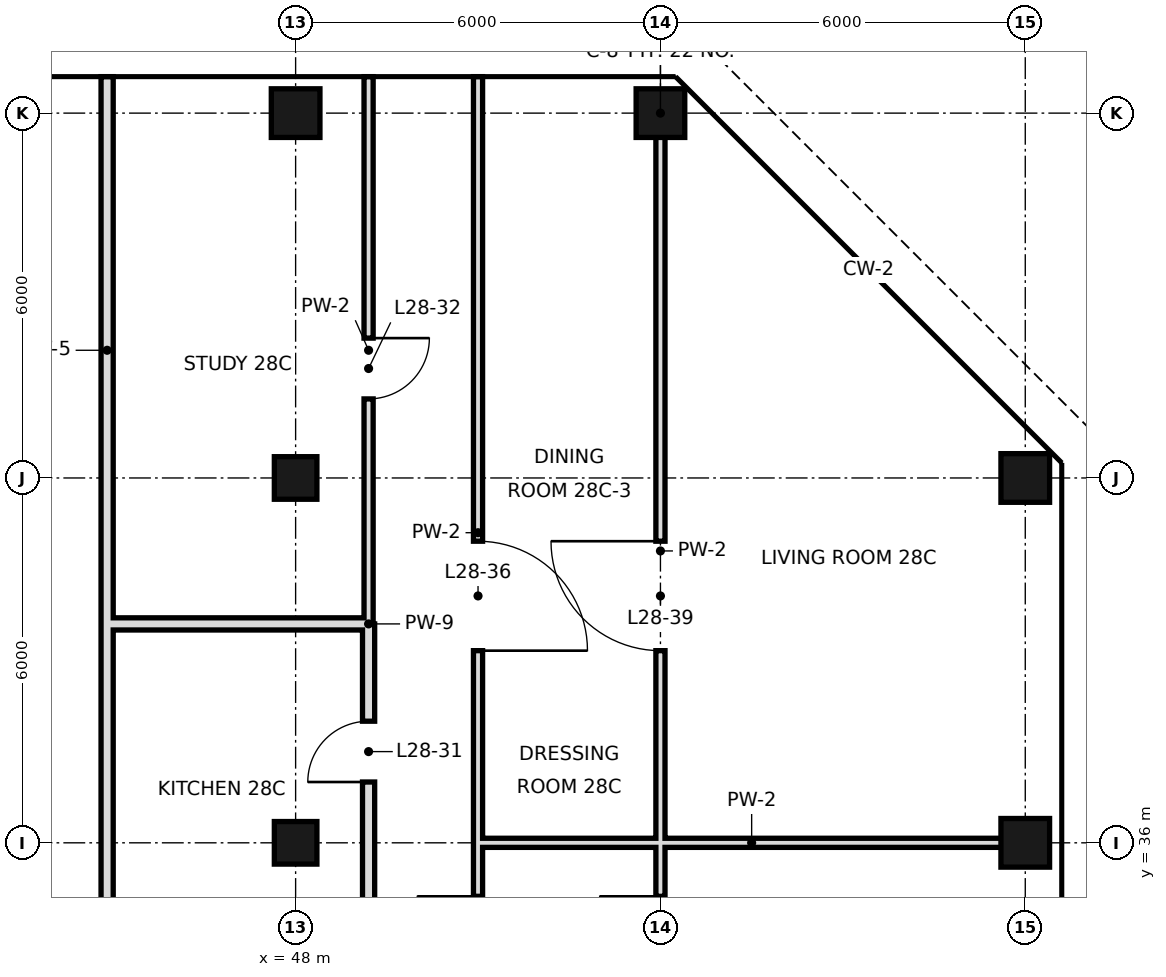
"""IFC4 building model, lengths in metres.
Left out: names, types, materials, properties, quantities, classifications, styles, units other than length and angle.
Written with IfcOpenShell. Run it as: python <this file> out.ifc"""

import sys

from ifc_helpers import new_model, si_unit, direction, frame, frame_2d, origin, origin_2d, place, context, subcontext, project, spatial, rectangle, hollow_rectangle, extrude, element, fill, save


model = new_model("IFC4")
c1 = context("Model", 3, precision=1e-05, world=origin(), true_north=direction((0.0, 1.0)))
c2 = subcontext(c1, "Body", "Model", "MODEL_VIEW")
j1 = project(units=[si_unit("LENGTHUNIT", "METRE"), si_unit("PLANEANGLEUNIT", "RADIAN")], contexts=[c1])
p1 = place(None, origin())
s1 = spatial("IfcSite", under=j1, at=p1, CompositionType="ELEMENT")
p2 = place(p1, origin())
s2 = spatial("IfcBuilding", under=s1, at=p2, CompositionType="ELEMENT")
p3 = place(p2, frame((0.0, 0.0, 126.8)))
s3 = spatial("IfcBuildingStorey", under=s2, at=p3, CompositionType="ELEMENT", Elevation=126.8)
for number, where, z_axis, x_axis in (
    (1, (48.0, 36.0, 0.0), (0.0, 0.0, 1.0), (1.0, 0.0, 0.0)),
    (2, (48.0, 42.0, 0.0), (0.0, 0.0, 1.0), (1.0, 0.0, 0.0)),
):
    element("IfcColumn", number, at=place(p3, frame(where, z_axis=z_axis, x_axis=x_axis)), inside=s3, PredefinedType="COLUMN", context=c2, shape_type="SweptSolid", body=[
        extrude(hollow_rectangle(XDim=0.7, YDim=0.7, WallThickness=0.036, at=origin_2d()), origin(), (0.0, 0.0, 1.0), 3.6),
    ])
for number, where, z_axis, x_axis in (
    (3, (48.0, 48.0, 0.0), (0.0, 0.0, 1.0), (1.0, 0.0, 0.0)),
    (4, (54.0, 48.0, 0.0), (0.0, 0.0, 1.0), (1.0, 0.0, 0.0)),
    (5, (60.0, 36.0, 0.0), (0.0, 0.0, 1.0), (1.0, 0.0, 0.0)),
    (6, (60.0, 42.0, 0.0), (0.0, 0.0, 1.0), (1.0, 0.0, 0.0)),
):
    element("IfcColumn", number, at=place(p3, frame(where, z_axis=z_axis, x_axis=x_axis)), inside=s3, PredefinedType="COLUMN", context=c2, shape_type="SweptSolid", body=[
        extrude(hollow_rectangle(XDim=0.8, YDim=0.8, WallThickness=0.04, at=origin_2d()), origin(), (0.0, 0.0, 1.0), 3.6),
    ])
p4 = place(p3, frame((44.9, 39.6, 0.0), z_axis=(0.0, 0.0, 1.0), x_axis=(0.0, 1.0, 0.0)))
e7 = element("IfcWall", 7, at=p4, inside=s3, PredefinedType="SOLIDWALL", context=c2, shape_type="SweptSolid", body=[
    extrude(rectangle(XDim=9.0, YDim=0.2, at=frame_2d((4.5, 0.0))), origin(), (0.0, 0.0, 1.0), 2.72),
])
p5 = place(p3, frame((44.9, 33.6, 0.0), z_axis=(0.0, 0.0, 1.0), x_axis=(0.0, 1.0, 0.0)))
e8 = element("IfcWall", 8, at=p5, inside=s3, PredefinedType="SOLIDWALL", context=c2, shape_type="SweptSolid", body=[
    extrude(rectangle(XDim=6.0, YDim=0.2, at=frame_2d((3.0, 0.0))), origin(), (0.0, 0.0, 1.0), 3.42),
])
p6 = place(p3, frame((49.2, 33.6, 0.0), z_axis=(0.0, 0.0, 1.0), x_axis=(0.0, 1.0, 0.0)))
e9 = element("IfcWall", 9, at=p6, inside=s3, PredefinedType="SOLIDWALL", context=c2, shape_type="SweptSolid", body=[
    extrude(rectangle(XDim=6.0, YDim=0.2, at=frame_2d((3.0, 0.0))), origin(), (0.0, 0.0, 1.0), 2.72),
])
p7 = place(p6, frame((3.4, 0.0, 0.0)))
e10 = element("IfcOpeningElement", 10, at=p7, cuts=e9, PredefinedType="OPENING", context=c2, shape_type="SweptSolid", body=[
    extrude(rectangle(XDim=1.0, YDim=2.4, at=frame_2d((0.5, 1.2))), frame((0.0, 0.11, 0.0), z_axis=(0.0, -1.0, 0.0), x_axis=(1.0, 0.0, 0.0)), (0.0, 0.0, 1.0), 0.22),
])
p8 = place(p3, frame((49.2, 39.6, 0.0), z_axis=(0.0, 0.0, 1.0), x_axis=(0.0, 1.0, 0.0)))
e11 = element("IfcWall", 11, at=p8, inside=s3, PredefinedType="PARTITIONING", context=c2, shape_type="SweptSolid", body=[
    extrude(rectangle(XDim=9.0, YDim=0.15, at=frame_2d((4.5, 0.0))), origin(), (0.0, 0.0, 1.0), 3.42),
])
p9 = place(p8, frame((3.7, 0.0, 0.0)))
e12 = element("IfcOpeningElement", 12, at=p9, cuts=e11, PredefinedType="OPENING", context=c2, shape_type="SweptSolid", body=[
    extrude(rectangle(XDim=1.0, YDim=2.4, at=frame_2d((0.5, 1.2))), frame((0.0, 0.085, 0.0), z_axis=(0.0, -1.0, 0.0), x_axis=(1.0, 0.0, 0.0)), (0.0, 0.0, 1.0), 0.17),
])
p10 = place(p3, frame((51.0, 33.6, 0.0), z_axis=(0.0, 0.0, 1.0), x_axis=(0.0, 1.0, 0.0)))
e13 = element("IfcWall", 13, at=p10, inside=s3, PredefinedType="PARTITIONING", context=c2, shape_type="SweptSolid", body=[
    extrude(rectangle(XDim=15.0, YDim=0.15, at=frame_2d((7.5, 0.0))), origin(), (0.0, 0.0, 1.0), 3.42),
])
p11 = place(p10, frame((0.52, 0.0, 0.0)))
e14 = element("IfcOpeningElement", 14, at=p11, cuts=e13, PredefinedType="OPENING", context=c2, shape_type="SweptSolid", body=[
    extrude(rectangle(XDim=1.0, YDim=2.4, at=frame_2d((0.5, 1.2))), frame((0.0, 0.085, 0.0), z_axis=(0.0, -1.0, 0.0), x_axis=(1.0, 0.0, 0.0)), (0.0, 0.0, 1.0), 0.17),
])
p12 = place(p10, frame((5.56, 0.0, 0.0)))
e15 = element("IfcOpeningElement", 15, at=p12, cuts=e13, PredefinedType="OPENING", context=c2, shape_type="SweptSolid", body=[
    extrude(rectangle(XDim=1.8, YDim=2.4, at=frame_2d((0.9, 1.2))), frame((0.0, 0.085, 0.0), z_axis=(0.0, -1.0, 0.0), x_axis=(1.0, 0.0, 0.0)), (0.0, 0.0, 1.0), 0.17),
])
p13 = place(p3, frame((54.0, 33.6, 0.0), z_axis=(0.0, 0.0, 1.0), x_axis=(0.0, 1.0, 0.0)))
e16 = element("IfcWall", 16, at=p13, inside=s3, PredefinedType="PARTITIONING", context=c2, shape_type="SweptSolid", body=[
    extrude(rectangle(XDim=14.4, YDim=0.15, at=frame_2d((7.2, 0.0))), origin(), (0.0, 0.0, 1.0), 3.42),
])
p14 = place(p13, frame((0.52, 0.0, 0.0)))
e17 = element("IfcOpeningElement", 17, at=p14, cuts=e16, PredefinedType="OPENING", context=c2, shape_type="SweptSolid", body=[
    extrude(rectangle(XDim=1.0, YDim=2.4, at=frame_2d((0.5, 1.2))), frame((0.0, 0.085, 0.0), z_axis=(0.0, -1.0, 0.0), x_axis=(1.0, 0.0, 0.0)), (0.0, 0.0, 1.0), 0.17),
])
p15 = place(p13, frame((5.56, 0.0, 0.0)))
e18 = element("IfcOpeningElement", 18, at=p15, cuts=e16, PredefinedType="OPENING", context=c2, shape_type="SweptSolid", body=[
    extrude(rectangle(XDim=1.8, YDim=2.4, at=frame_2d((0.9, 1.2))), frame((0.0, 0.085, 0.0), z_axis=(0.0, -1.0, 0.0), x_axis=(1.0, 0.0, 0.0)), (0.0, 0.0, 1.0), 0.17),
])
p16 = place(p3, frame((51.0, 36.0, 0.0), z_axis=(0.0, 0.0, 1.0), x_axis=(1.0, 0.0, 0.0)))
e19 = element("IfcWall", 19, at=p16, inside=s3, PredefinedType="PARTITIONING", context=c2, shape_type="SweptSolid", body=[
    extrude(rectangle(XDim=9.0, YDim=0.15, at=frame_2d((4.5, 0.0))), origin(), (0.0, 0.0, 1.0), 2.72),
])
p17 = place(p3, frame((44.9, 39.6, 0.0), z_axis=(0.0, 0.0, 1.0), x_axis=(1.0, 0.0, 0.0)))
e20 = element("IfcWall", 20, at=p17, inside=s3, PredefinedType="SOLIDWALL", context=c2, shape_type="SweptSolid", body=[
    extrude(rectangle(XDim=4.3, YDim=0.2, at=frame_2d((2.15, 0.0))), origin(), (0.0, 0.0, 1.0), 2.97),
])
p18 = place(p7, origin())
e21 = element("IfcDoor", 21, at=p18, inside=s3, OperationType="SINGLE_SWING_LEFT", PredefinedType="DOOR", context=c2, shape_type="SweptSolid", body=[
    extrude(rectangle(XDim=1.0, YDim=2.4, at=frame_2d((0.5, 1.2))), frame((0.0, 0.025, 0.0), z_axis=(0.0, -1.0, 0.0), x_axis=(1.0, 0.0, 0.0)), (0.0, 0.0, 1.0), 0.05),
])
fill(e10, e21)
p19 = place(p9, origin())
e22 = element("IfcDoor", 22, at=p19, inside=s3, OperationType="SINGLE_SWING_RIGHT", PredefinedType="DOOR", context=c2, shape_type="SweptSolid", body=[
    extrude(rectangle(XDim=1.0, YDim=2.4, at=frame_2d((0.5, 1.2))), frame((0.0, 0.025, 0.0), z_axis=(0.0, -1.0, 0.0), x_axis=(1.0, 0.0, 0.0)), (0.0, 0.0, 1.0), 0.05),
])
fill(e12, e22)
p20 = place(p11, frame((1.0, 0.0, 0.0), z_axis=(0.0, 0.0, 1.0), x_axis=(-1.0, 0.0, 0.0)))
e23 = element("IfcDoor", 23, at=p20, inside=s3, OperationType="SINGLE_SWING_LEFT", PredefinedType="DOOR", context=c2, shape_type="SweptSolid", body=[
    extrude(rectangle(XDim=1.0, YDim=2.4, at=frame_2d((0.5, 1.2))), frame((0.0, 0.025, 0.0), z_axis=(0.0, -1.0, 0.0), x_axis=(1.0, 0.0, 0.0)), (0.0, 0.0, 1.0), 0.05),
])
fill(e14, e23)
p21 = place(p12, frame((1.8, 0.0, 0.0), z_axis=(0.0, 0.0, 1.0), x_axis=(-1.0, 0.0, 0.0)))
e24 = element("IfcDoor", 24, at=p21, inside=s3, OperationType="SINGLE_SWING_RIGHT", PredefinedType="DOOR", context=c2, shape_type="SweptSolid", body=[
    extrude(rectangle(XDim=1.8, YDim=2.4, at=frame_2d((0.9, 1.2))), frame((0.0, 0.025, 0.0), z_axis=(0.0, -1.0, 0.0), x_axis=(1.0, 0.0, 0.0)), (0.0, 0.0, 1.0), 0.05),
])
fill(e15, e24)
p22 = place(p14, frame((1.0, 0.0, 0.0), z_axis=(0.0, 0.0, 1.0), x_axis=(-1.0, 0.0, 0.0)))
e25 = element("IfcDoor", 25, at=p22, inside=s3, OperationType="SINGLE_SWING_LEFT", PredefinedType="DOOR", context=c2, shape_type="SweptSolid", body=[
    extrude(rectangle(XDim=1.0, YDim=2.4, at=frame_2d((0.5, 1.2))), frame((0.0, 0.025, 0.0), z_axis=(0.0, -1.0, 0.0), x_axis=(1.0, 0.0, 0.0)), (0.0, 0.0, 1.0), 0.05),
])
fill(e17, e25)
p23 = place(p15, frame((1.8, 0.0, 0.0), z_axis=(0.0, 0.0, 1.0), x_axis=(-1.0, 0.0, 0.0)))
e26 = element("IfcDoor", 26, at=p23, inside=s3, OperationType="SINGLE_SWING_LEFT", PredefinedType="DOOR", context=c2, shape_type="SweptSolid", body=[
    extrude(rectangle(XDim=1.8, YDim=2.4, at=frame_2d((0.9, 1.2))), frame((0.0, 0.025, 0.0), z_axis=(0.0, -1.0, 0.0), x_axis=(1.0, 0.0, 0.0)), (0.0, 0.0, 1.0), 0.05),
])
fill(e18, e26)
save(model, sys.argv[1])
